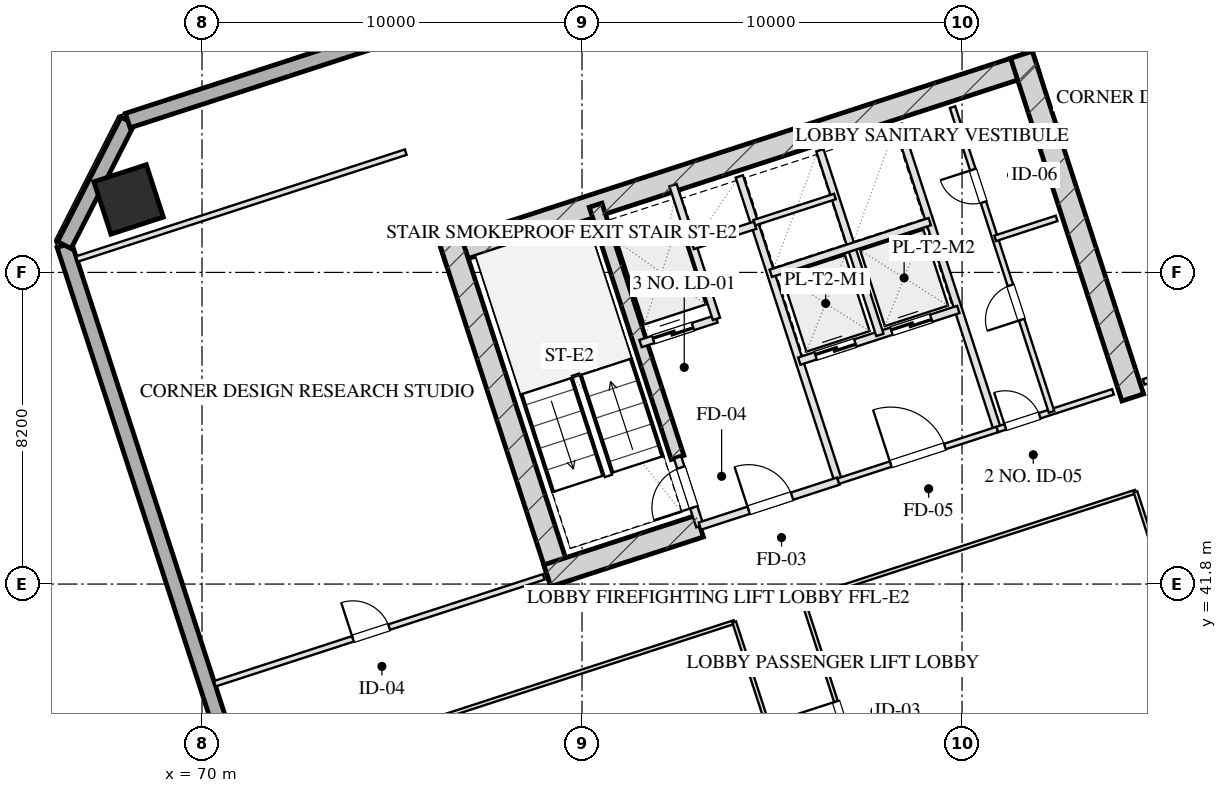
"""IFC4 building model, lengths in metres.
Left out: names, types, materials, properties, quantities, classifications, styles, units other than length and angle.
Written with IfcOpenShell. Run it as: python <this file> out.ifc"""

import sys

from ifc_helpers import new_model, si_unit, direction, frame, frame_2d, origin, origin_2d, place, context, subcontext, project, spatial, rectangle, hollow_rectangle, extrude, element, fill, save


model = new_model("IFC4")
c1 = context("Model", 3, precision=1e-05, world=origin(), true_north=direction((0.0, 1.0)))
c2 = subcontext(c1, "Body", "Model", "MODEL_VIEW")
j1 = project(units=[si_unit("LENGTHUNIT", "METRE"), si_unit("PLANEANGLEUNIT", "RADIAN")], contexts=[c1])
p1 = place(None, origin())
s1 = spatial("IfcSite", under=j1, at=p1, CompositionType="ELEMENT")
p2 = place(p1, origin())
s2 = spatial("IfcBuilding", under=s1, at=p2, CompositionType="ELEMENT")
p3 = place(p2, frame((0.0, 0.0, 127.65)))
s3 = spatial("IfcBuildingStorey", under=s2, at=p3, CompositionType="ELEMENT", Elevation=127.65)
p4 = place(p3, frame((76.344, 50.466, 0.0), z_axis=(0.0, 0.0, 1.0), x_axis=(0.951055727519, 0.309019421968, 0.0)))
e1 = element("IfcWall", 1, at=p4, inside=s3, PredefinedType="SHEAR", context=c2, shape_type="SweptSolid", body=[
    extrude(rectangle(XDim=16.4, YDim=0.6, at=frame_2d((8.2, 0.0))), origin(), (0.0, 0.0, 1.0), 3.45),
])
for number, where, z_axis, x_axis in (
    (2, (79.466, 41.828, 0.0), (0.0, 0.0, 1.0), (-0.309, 0.951, 0.0)),
    (3, (94.492, 46.71, 0.0), (0.0, 0.0, 1.0), (-0.309, 0.951, 0.0)),
):
    element("IfcWall", number, at=place(p3, frame(where, z_axis=z_axis, x_axis=x_axis)), inside=s3, PredefinedType="SHEAR", context=c2, shape_type="SweptSolid", body=[
        extrude(rectangle(XDim=9.48, YDim=0.6, at=frame_2d((4.74, 0.0))), origin(), (0.0, 0.0, 1.0), 3.45),
    ])
p5 = place(p3, frame((82.514, 45.131, 0.0), z_axis=(0.0, 0.0, 1.0), x_axis=(-0.308988790936, 0.951065679686, 0.0)))
e4 = element("IfcWall", 4, at=p5, inside=s3, PredefinedType="SHEAR", context=c2, shape_type="SweptSolid", body=[
    extrude(rectangle(XDim=6.98, YDim=0.35, at=frame_2d((3.49, 0.0))), origin(), (0.0, 0.0, 1.0), 3.45),
])
p6 = place(p3, frame((79.087, 42.021, 0.0), z_axis=(0.0, 0.0, 1.0), x_axis=(0.951062550203, 0.3089984233, 0.0)))
e5 = element("IfcWall", 5, at=p6, inside=s3, PredefinedType="SHEAR", context=c2, shape_type="SweptSolid", body=[
    extrude(rectangle(XDim=4.22, YDim=0.6, at=frame_2d((2.11, 0.0))), origin(), (0.0, 0.0, 1.0), 3.45),
])
p7 = place(p3, frame((68.069, 51.92, 0.0), z_axis=(0.0, 0.0, 1.0), x_axis=(0.951056516295, 0.309016994375, 0.0)))
e6 = element("IfcColumn", 6, at=p7, inside=s3, PredefinedType="COLUMN", context=c2, shape_type="SweptSolid", body=[
    extrude(hollow_rectangle(XDim=1.45, YDim=1.45, WallThickness=0.05, at=origin_2d()), origin(), (0.0, 0.0, 1.0), 3.451),
])
p8 = place(p3, frame((80.716, 6.59, 0.0), z_axis=(0.0, 0.0, 1.0), x_axis=(-0.309017542002, 0.95105633836, 0.0)))
e7 = element("IfcWall", 7, at=p8, inside=s3, PredefinedType="SOLIDWALL", context=c2, shape_type="SweptSolid", body=[
    extrude(rectangle(XDim=46.4, YDim=0.4, at=frame_2d((23.2, 0.0))), origin(), (0.0, 0.0, 1.0), 2.61),
])
p9 = place(p8, frame((15.675, 0.0, 0.75)))
e8 = element("IfcOpeningElement", 8, at=p9, cuts=e7, PredefinedType="OPENING", context=c2, shape_type="SweptSolid", body=[
    extrude(rectangle(XDim=2.25, YDim=1.46, at=frame_2d((1.125, 0.73))), frame((0.0, 0.21, 0.0), z_axis=(0.0, -1.0, 0.0), x_axis=(1.0, 0.0, 0.0)), (0.0, 0.0, 1.0), 0.42),
])
p10 = place(p8, frame((19.475, 0.0, 0.75)))
e9 = element("IfcOpeningElement", 9, at=p10, cuts=e7, PredefinedType="OPENING", context=c2, shape_type="SweptSolid", body=[
    extrude(rectangle(XDim=2.25, YDim=1.46, at=frame_2d((1.125, 0.73))), frame((0.0, 0.21, 0.0), z_axis=(0.0, -1.0, 0.0), x_axis=(1.0, 0.0, 0.0)), (0.0, 0.0, 1.0), 0.42),
])
p11 = place(p8, frame((24.675, 0.0, 0.75)))
e10 = element("IfcOpeningElement", 10, at=p11, cuts=e7, PredefinedType="OPENING", context=c2, shape_type="SweptSolid", body=[
    extrude(rectangle(XDim=2.25, YDim=1.46, at=frame_2d((1.125, 0.73))), frame((0.0, 0.21, 0.0), z_axis=(0.0, -1.0, 0.0), x_axis=(1.0, 0.0, 0.0)), (0.0, 0.0, 1.0), 0.42),
])
p12 = place(p8, frame((28.475, 0.0, 0.75)))
e11 = element("IfcOpeningElement", 11, at=p12, cuts=e7, PredefinedType="OPENING", context=c2, shape_type="SweptSolid", body=[
    extrude(rectangle(XDim=2.25, YDim=1.46, at=frame_2d((1.125, 0.73))), frame((0.0, 0.21, 0.0), z_axis=(0.0, -1.0, 0.0), x_axis=(1.0, 0.0, 0.0)), (0.0, 0.0, 1.0), 0.42),
])
p13 = place(p3, frame((66.377, 50.719, 0.0), z_axis=(0.0, 0.0, 1.0), x_axis=(0.454026238093, 0.890988313685, 0.0)))
e12 = element("IfcWall", 12, at=p13, inside=s3, PredefinedType="SOLIDWALL", context=c2, shape_type="SweptSolid", body=[
    extrude(rectangle(XDim=3.677, YDim=0.4, at=frame_2d((1.838, 0.0))), origin(), (0.0, 0.0, 1.0), 2.61),
])
p14 = place(p3, frame((68.047, 53.995, 0.0), z_axis=(0.0, 0.0, 1.0), x_axis=(0.95105505922, 0.309021478754, 0.0)))
e13 = element("IfcWall", 13, at=p14, inside=s3, PredefinedType="SOLIDWALL", context=c2, shape_type="SweptSolid", body=[
    extrude(rectangle(XDim=29.4, YDim=0.4, at=frame_2d((14.7, 0.0))), origin(), (0.0, 0.0, 1.0), 2.61),
])
p15 = place(p3, frame((83.101, 43.324, 0.0), z_axis=(0.0, 0.0, 1.0), x_axis=(-0.309048298632, 0.951046344356, 0.0)))
e14 = element("IfcWall", 14, at=p15, inside=s3, PredefinedType="PARTITIONING", context=c2, shape_type="SweptSolid", body=[
    extrude(rectangle(XDim=1.9, YDim=0.2, at=frame_2d((0.95, 0.0))), origin(), (0.0, 0.0, 1.0), 3.175),
])
p16 = place(p15, frame((0.52, 0.0, 0.0)))
e15 = element("IfcOpeningElement", 15, at=p16, cuts=e14, PredefinedType="OPENING", context=c2, shape_type="SweptSolid", body=[
    extrude(rectangle(XDim=1.1, YDim=2.05, at=frame_2d((0.55, 1.025))), frame((0.0, 0.11, 0.0), z_axis=(0.0, -1.0, 0.0), x_axis=(1.0, 0.0, 0.0)), (0.0, 0.0, 1.0), 0.22),
])
p17 = place(p3, frame((86.743, 44.508, 0.0), z_axis=(0.0, 0.0, 1.0), x_axis=(-0.309016001439, 0.951056838919, 0.0)))
e16 = element("IfcWall", 16, at=p17, inside=s3, PredefinedType="PARTITIONING", context=c2, shape_type="SweptSolid", body=[
    extrude(rectangle(XDim=8.43, YDim=0.2, at=frame_2d((4.215, 0.0))), origin(), (0.0, 0.0, 1.0), 3.175),
])
p18 = place(p3, frame((83.101, 43.324, 0.0), z_axis=(0.0, 0.0, 1.0), x_axis=(0.951052804469, 0.309028417967, 0.0)))
e17 = element("IfcWall", 17, at=p18, inside=s3, PredefinedType="PARTITIONING", context=c2, shape_type="SweptSolid", body=[
    extrude(rectangle(XDim=3.83, YDim=0.2, at=frame_2d((1.915, 0.0))), origin(), (0.0, 0.0, 1.0), 3.175),
])
p19 = place(p18, frame((1.35, 0.0, 0.0)))
e18 = element("IfcOpeningElement", 18, at=p19, cuts=e17, PredefinedType="OPENING", context=c2, shape_type="SweptSolid", body=[
    extrude(rectangle(XDim=1.2, YDim=2.05, at=frame_2d((0.6, 1.025))), frame((0.0, 0.11, 0.0), z_axis=(0.0, -1.0, 0.0), x_axis=(1.0, 0.0, 0.0)), (0.0, 0.0, 1.0), 0.22),
])
p20 = place(p3, frame((81.54, 48.127, 0.0), z_axis=(0.0, 0.0, 1.0), x_axis=(0.951062257173, 0.308999325213, 0.0)))
e19 = element("IfcWall", 19, at=p20, inside=s3, PredefinedType="PARTITIONING", context=c2, shape_type="SweptSolid", body=[
    extrude(rectangle(XDim=2.1, YDim=0.2, at=frame_2d((1.05, 0.0))), origin(), (0.0, 0.0, 1.0), 3.175),
])
p21 = place(p20, frame((0.35, 0.0, 0.0)))
e20 = element("IfcOpeningElement", 20, at=p21, cuts=e19, PredefinedType="OPENING", context=c2, shape_type="SweptSolid", body=[
    extrude(rectangle(XDim=1.1, YDim=2.05, at=frame_2d((0.55, 1.025))), frame((0.0, 0.11, 0.0), z_axis=(0.0, -1.0, 0.0), x_axis=(1.0, 0.0, 0.0)), (0.0, 0.0, 1.0), 0.22),
])
p22 = place(p3, frame((83.538, 48.776, 0.0), z_axis=(0.0, 0.0, 1.0), x_axis=(-0.3089935693, 0.951064127245, 0.0)))
e21 = element("IfcWall", 21, at=p22, inside=s3, PredefinedType="PARTITIONING", context=c2, shape_type="SweptSolid", body=[
    extrude(rectangle(XDim=3.7, YDim=0.2, at=frame_2d((1.85, 0.0))), origin(), (0.0, 0.0, 1.0), 3.175),
])
p23 = place(p3, frame((82.91, 50.707, 0.0), z_axis=(0.0, 0.0, 1.0), x_axis=(0.951041328149, 0.309063734775, 0.0)))
e22 = element("IfcWall", 22, at=p23, inside=s3, PredefinedType="PARTITIONING", context=c2, shape_type="SweptSolid", body=[
    extrude(rectangle(XDim=1.73, YDim=0.2, at=frame_2d((0.865, 0.0))), origin(), (0.0, 0.0, 1.0), 3.175),
])
p24 = place(p3, frame((90.928, 45.868, 0.0), z_axis=(0.0, 0.0, 1.0), x_axis=(-0.309042196757, 0.951048327176, 0.0)))
e23 = element("IfcWall", 23, at=p24, inside=s3, PredefinedType="PARTITIONING", context=c2, shape_type="SweptSolid", body=[
    extrude(rectangle(XDim=8.43, YDim=0.2, at=frame_2d((4.215, 0.0))), origin(), (0.0, 0.0, 1.0), 3.175),
])
p25 = place(p3, frame((86.743, 44.508, 0.0), z_axis=(0.0, 0.0, 1.0), x_axis=(0.951063829732, 0.308994485023, 0.0)))
e24 = element("IfcWall", 24, at=p25, inside=s3, PredefinedType="PARTITIONING", context=c2, shape_type="SweptSolid", body=[
    extrude(rectangle(XDim=4.4, YDim=0.15, at=frame_2d((2.2, 0.0))), origin(), (0.0, 0.0, 1.0), 3.175),
])
p26 = place(p25, frame((1.45, 0.0, 0.0)))
e25 = element("IfcOpeningElement", 25, at=p26, cuts=e24, PredefinedType="OPENING", context=c2, shape_type="SweptSolid", body=[
    extrude(rectangle(XDim=1.5, YDim=2.05, at=frame_2d((0.75, 1.025))), frame((0.0, 0.085, 0.0), z_axis=(0.0, -1.0, 0.0), x_axis=(1.0, 0.0, 0.0)), (0.0, 0.0, 1.0), 0.17),
])
p27 = place(p3, frame((85.718, 47.666, 0.0), z_axis=(0.0, 0.0, 1.0), x_axis=(0.951058531764, 0.30901079133, 0.0)))
e26 = element("IfcWall", 26, at=p27, inside=s3, PredefinedType="PARTITIONING", context=c2, shape_type="SweptSolid", body=[
    extrude(rectangle(XDim=4.4, YDim=0.2, at=frame_2d((2.2, 0.0))), origin(), (0.0, 0.0, 1.0), 3.175),
])
p28 = place(p27, frame((0.45, 0.0, 0.0)))
e27 = element("IfcOpeningElement", 27, at=p28, cuts=e26, PredefinedType="OPENING", context=c2, shape_type="SweptSolid", body=[
    extrude(rectangle(XDim=1.1, YDim=2.05, at=frame_2d((0.55, 1.025))), frame((0.0, 0.11, 0.0), z_axis=(0.0, -1.0, 0.0), x_axis=(1.0, 0.0, 0.0)), (0.0, 0.0, 1.0), 0.22),
])
p29 = place(p27, frame((2.55, 0.0, 0.0)))
e28 = element("IfcOpeningElement", 28, at=p29, cuts=e26, PredefinedType="OPENING", context=c2, shape_type="SweptSolid", body=[
    extrude(rectangle(XDim=1.1, YDim=2.05, at=frame_2d((0.55, 1.025))), frame((0.0, 0.11, 0.0), z_axis=(0.0, -1.0, 0.0), x_axis=(1.0, 0.0, 0.0)), (0.0, 0.0, 1.0), 0.22),
])
p30 = place(p3, frame((87.838, 48.354, 0.0), z_axis=(0.0, 0.0, 1.0), x_axis=(-0.3090093719, 0.951058992953, 0.0)))
e29 = element("IfcWall", 29, at=p30, inside=s3, PredefinedType="PARTITIONING", context=c2, shape_type="SweptSolid", body=[
    extrude(rectangle(XDim=5.11, YDim=0.2, at=frame_2d((2.555, 0.0))), origin(), (0.0, 0.0, 1.0), 3.175),
])
p31 = place(p3, frame((84.967, 49.977, 0.0), z_axis=(0.0, 0.0, 1.0), x_axis=(0.951063829732, 0.308994485023, 0.0)))
e30 = element("IfcWall", 30, at=p31, inside=s3, PredefinedType="PARTITIONING", context=c2, shape_type="SweptSolid", body=[
    extrude(rectangle(XDim=4.4, YDim=0.2, at=frame_2d((2.2, 0.0))), origin(), (0.0, 0.0, 1.0), 3.175),
])
p32 = place(p3, frame((84.534, 51.308, 0.0), z_axis=(0.0, 0.0, 1.0), x_axis=(0.951075093106, 0.308959814982, 0.0)))
e31 = element("IfcWall", 31, at=p32, inside=s3, PredefinedType="PARTITIONING", context=c2, shape_type="SweptSolid", body=[
    extrude(rectangle(XDim=2.23, YDim=0.15, at=frame_2d((1.115, 0.0))), origin(), (0.0, 0.0, 1.0), 3.175),
])
p33 = place(p3, frame((90.928, 45.868, 0.0), z_axis=(0.0, 0.0, 1.0), x_axis=(0.951059297078, 0.309008435874, 0.0)))
e32 = element("IfcWall", 32, at=p33, inside=s3, PredefinedType="PARTITIONING", context=c2, shape_type="SweptSolid", body=[
    extrude(rectangle(XDim=3.2, YDim=0.15, at=frame_2d((1.6, 0.0))), origin(), (0.0, 0.0, 1.0), 3.175),
])
p34 = place(p33, frame((0.22, 0.0, 0.0)))
e33 = element("IfcOpeningElement", 33, at=p34, cuts=e32, PredefinedType="OPENING", context=c2, shape_type="SweptSolid", body=[
    extrude(rectangle(XDim=0.95, YDim=2.05, at=frame_2d((0.475, 1.025))), frame((0.0, 0.085, 0.0), z_axis=(0.0, -1.0, 0.0), x_axis=(1.0, 0.0, 0.0)), (0.0, 0.0, 1.0), 0.17),
])
p35 = place(p3, frame((92.355, 46.331, 0.0), z_axis=(0.0, 0.0, 1.0), x_axis=(-0.309007490203, 0.951059604335, 0.0)))
e34 = element("IfcWall", 34, at=p35, inside=s3, PredefinedType="PARTITIONING", context=c2, shape_type="SweptSolid", body=[
    extrude(rectangle(XDim=8.43, YDim=0.15, at=frame_2d((4.215, 0.0))), origin(), (0.0, 0.0, 1.0), 3.175),
])
p36 = place(p35, frame((2.55, 0.0, 0.0)))
e35 = element("IfcOpeningElement", 35, at=p36, cuts=e34, PredefinedType="OPENING", context=c2, shape_type="SweptSolid", body=[
    extrude(rectangle(XDim=0.95, YDim=2.05, at=frame_2d((0.475, 1.025))), frame((0.0, 0.085, 0.0), z_axis=(0.0, -1.0, 0.0), x_axis=(1.0, 0.0, 0.0)), (0.0, 0.0, 1.0), 0.17),
])
p37 = place(p35, frame((5.8, 0.0, 0.0)))
e36 = element("IfcOpeningElement", 36, at=p37, cuts=e34, PredefinedType="OPENING", context=c2, shape_type="SweptSolid", body=[
    extrude(rectangle(XDim=0.9, YDim=2.05, at=frame_2d((0.45, 1.025))), frame((0.0, 0.085, 0.0), z_axis=(0.0, -1.0, 0.0), x_axis=(1.0, 0.0, 0.0)), (0.0, 0.0, 1.0), 0.17),
])
p38 = place(p3, frame((90.871, 50.896, 0.0), z_axis=(0.0, 0.0, 1.0), x_axis=(0.951054116971, 0.309024378638, 0.0)))
e37 = element("IfcWall", 37, at=p38, inside=s3, PredefinedType="PARTITIONING", context=c2, shape_type="SweptSolid", body=[
    extrude(rectangle(XDim=1.7, YDim=0.15, at=frame_2d((0.85, 0.0))), origin(), (0.0, 0.0, 1.0), 3.175),
])
p39 = place(p3, frame((66.707, 50.352, 0.0), z_axis=(0.0, 0.0, 1.0), x_axis=(0.951057133767, 0.309015093986, 0.0)))
e38 = element("IfcWall", 38, at=p39, inside=s3, PredefinedType="PARTITIONING", context=c2, shape_type="SweptSolid", body=[
    extrude(rectangle(XDim=9.1, YDim=0.15, at=frame_2d((4.55, 0.0))), origin(), (0.0, 0.0, 1.0), 3.175),
])
p40 = place(p3, frame((70.338, 39.177, 0.0), z_axis=(0.0, 0.0, 1.0), x_axis=(0.951059695568, 0.309007209409, 0.0)))
e39 = element("IfcWall", 39, at=p40, inside=s3, PredefinedType="PARTITIONING", context=c2, shape_type="SweptSolid", body=[
    extrude(rectangle(XDim=9.1, YDim=0.15, at=frame_2d((4.55, 0.0))), origin(), (0.0, 0.0, 1.0), 3.175),
])
p41 = place(p40, frame((3.822, 0.0, 0.0)))
e40 = element("IfcOpeningElement", 40, at=p41, cuts=e39, PredefinedType="OPENING", context=c2, shape_type="SweptSolid", body=[
    extrude(rectangle(XDim=1.0, YDim=2.05, at=frame_2d((0.5, 1.025))), frame((0.0, 0.085, 0.0), z_axis=(0.0, -1.0, 0.0), x_axis=(1.0, 0.0, 0.0)), (0.0, 0.0, 1.0), 0.17),
])
p42 = place(p3, frame((94.78, 47.119, 0.0), z_axis=(0.0, 0.0, 1.0), x_axis=(0.951054329824, 0.309023723562, 0.0)))
e41 = element("IfcWall", 41, at=p42, inside=s3, PredefinedType="PARTITIONING", context=c2, shape_type="SweptSolid", body=[
    extrude(rectangle(XDim=8.5, YDim=0.15, at=frame_2d((4.25, 0.0))), origin(), (0.0, 0.0, 1.0), 3.175),
])
p43 = place(p42, frame((3.57, 0.0, 0.0)))
e42 = element("IfcOpeningElement", 42, at=p43, cuts=e41, PredefinedType="OPENING", context=c2, shape_type="SweptSolid", body=[
    extrude(rectangle(XDim=0.85, YDim=2.05, at=frame_2d((0.425, 1.025))), frame((0.0, 0.085, 0.0), z_axis=(0.0, -1.0, 0.0), x_axis=(1.0, 0.0, 0.0)), (0.0, 0.0, 1.0), 0.17),
])
p44 = place(p3, frame((71.166, 36.629, 0.0), z_axis=(0.0, 0.0, 1.0), x_axis=(0.951057589409, 0.309013691651, 0.0)))
e43 = element("IfcWall", 43, at=p44, inside=s3, PredefinedType="MOVABLE", context=c2, shape_type="SweptSolid", body=[
    extrude(rectangle(XDim=13.5, YDim=0.1, at=frame_2d((6.75, 0.0))), origin(), (0.0, 0.0, 1.0), 3.175),
])
p45 = place(p3, frame((85.812, 41.387, 0.0), z_axis=(0.0, 0.0, 1.0), x_axis=(0.951054933035, 0.309021867106, 0.0)))
e44 = element("IfcWall", 44, at=p45, inside=s3, PredefinedType="MOVABLE", context=c2, shape_type="SweptSolid", body=[
    extrude(rectangle(XDim=9.2, YDim=0.1, at=frame_2d((4.6, 0.0))), origin(), (0.0, 0.0, 1.0), 3.175),
])
p46 = place(p3, frame((89.147, 24.975, 0.0), z_axis=(0.0, 0.0, 1.0), x_axis=(-0.309022042254, 0.951054876125, 0.0)))
e45 = element("IfcWall", 45, at=p46, inside=s3, PredefinedType="MOVABLE", context=c2, shape_type="SweptSolid", body=[
    extrude(rectangle(XDim=16.64, YDim=0.1, at=frame_2d((8.32, 0.0))), origin(), (0.0, 0.0, 1.0), 3.175),
])
p47 = place(p46, frame((3.32, 0.0, 0.0)))
e46 = element("IfcOpeningElement", 46, at=p47, cuts=e45, PredefinedType="OPENING", context=c2, shape_type="SweptSolid", body=[
    extrude(rectangle(XDim=1.0, YDim=2.05, at=frame_2d((0.5, 1.025))), frame((0.0, 0.06, 0.0), z_axis=(0.0, -1.0, 0.0), x_axis=(1.0, 0.0, 0.0)), (0.0, 0.0, 1.0), 0.12),
])
p48 = place(p46, frame((11.64, 0.0, 0.0)))
e47 = element("IfcOpeningElement", 47, at=p48, cuts=e45, PredefinedType="OPENING", context=c2, shape_type="SweptSolid", body=[
    extrude(rectangle(XDim=1.0, YDim=2.05, at=frame_2d((0.5, 1.025))), frame((0.0, 0.06, 0.0), z_axis=(0.0, -1.0, 0.0), x_axis=(1.0, 0.0, 0.0)), (0.0, 0.0, 1.0), 0.12),
])
p49 = place(p3, frame((90.954, 25.562, 0.0), z_axis=(0.0, 0.0, 1.0), x_axis=(-0.30901773025, 0.951056277195, 0.0)))
e48 = element("IfcWall", 48, at=p49, inside=s3, PredefinedType="MOVABLE", context=c2, shape_type="SweptSolid", body=[
    extrude(rectangle(XDim=16.64, YDim=0.1, at=frame_2d((8.32, 0.0))), origin(), (0.0, 0.0, 1.0), 3.175),
])
p50 = place(p49, frame((4.284, 0.0, 0.0)))
e49 = element("IfcOpeningElement", 49, at=p50, cuts=e48, PredefinedType="OPENING", context=c2, shape_type="SweptSolid", body=[
    extrude(rectangle(XDim=1.1, YDim=2.05, at=frame_2d((0.55, 1.025))), frame((0.0, 0.06, 0.0), z_axis=(0.0, -1.0, 0.0), x_axis=(1.0, 0.0, 0.0)), (0.0, 0.0, 1.0), 0.12),
])
p51 = place(p49, frame((12.724, 0.0, 0.0)))
e50 = element("IfcOpeningElement", 50, at=p51, cuts=e48, PredefinedType="OPENING", context=c2, shape_type="SweptSolid", body=[
    extrude(rectangle(XDim=1.1, YDim=2.05, at=frame_2d((0.55, 1.025))), frame((0.0, 0.06, 0.0), z_axis=(0.0, -1.0, 0.0), x_axis=(1.0, 0.0, 0.0)), (0.0, 0.0, 1.0), 0.12),
])
p52 = place(p3, frame((99.704, 28.405, 0.0), z_axis=(0.0, 0.0, 1.0), x_axis=(-0.309004459387, 0.951060589068, 0.0)))
e51 = element("IfcWall", 51, at=p52, inside=s3, PredefinedType="MOVABLE", context=c2, shape_type="SweptSolid", body=[
    extrude(rectangle(XDim=16.64, YDim=0.1, at=frame_2d((8.32, 0.0))), origin(), (0.0, 0.0, 1.0), 3.175),
])
p53 = place(p16, origin())
e52 = element("IfcDoor", 52, at=p53, inside=s3, OperationType="SINGLE_SWING_LEFT", PredefinedType="DOOR", context=c2, shape_type="SweptSolid", body=[
    extrude(rectangle(XDim=1.1, YDim=2.05, at=frame_2d((0.55, 1.025))), frame((0.0, 0.025, 0.0), z_axis=(0.0, -1.0, 0.0), x_axis=(1.0, 0.0, 0.0)), (0.0, 0.0, 1.0), 0.05),
])
fill(e15, e52)
p54 = place(p19, origin())
e53 = element("IfcDoor", 53, at=p54, inside=s3, OperationType="SINGLE_SWING_LEFT", PredefinedType="DOOR", context=c2, shape_type="SweptSolid", body=[
    extrude(rectangle(XDim=1.2, YDim=2.05, at=frame_2d((0.6, 1.025))), frame((0.0, 0.025, 0.0), z_axis=(0.0, -1.0, 0.0), x_axis=(1.0, 0.0, 0.0)), (0.0, 0.0, 1.0), 0.05),
])
fill(e18, e53)
p55 = place(p21, origin())
e54 = element("IfcDoor", 54, at=p55, inside=s3, OperationType="DOUBLE_DOOR_SLIDING", PredefinedType="DOOR", context=c2, shape_type="SweptSolid", body=[
    extrude(rectangle(XDim=1.1, YDim=2.05, at=frame_2d((0.55, 1.025))), frame((0.0, 0.025, 0.0), z_axis=(0.0, -1.0, 0.0), x_axis=(1.0, 0.0, 0.0)), (0.0, 0.0, 1.0), 0.05),
])
fill(e20, e54)
p56 = place(p26, origin())
e55 = element("IfcDoor", 55, at=p56, inside=s3, OperationType="SINGLE_SWING_LEFT", PredefinedType="DOOR", context=c2, shape_type="SweptSolid", body=[
    extrude(rectangle(XDim=1.5, YDim=2.05, at=frame_2d((0.75, 1.025))), frame((0.0, 0.025, 0.0), z_axis=(0.0, -1.0, 0.0), x_axis=(1.0, 0.0, 0.0)), (0.0, 0.0, 1.0), 0.05),
])
fill(e25, e55)
p57 = place(p28, origin())
e56 = element("IfcDoor", 56, at=p57, inside=s3, OperationType="DOUBLE_DOOR_SLIDING", PredefinedType="DOOR", context=c2, shape_type="SweptSolid", body=[
    extrude(rectangle(XDim=1.1, YDim=2.05, at=frame_2d((0.55, 1.025))), frame((0.0, 0.025, 0.0), z_axis=(0.0, -1.0, 0.0), x_axis=(1.0, 0.0, 0.0)), (0.0, 0.0, 1.0), 0.05),
])
fill(e27, e56)
p58 = place(p29, origin())
e57 = element("IfcDoor", 57, at=p58, inside=s3, OperationType="DOUBLE_DOOR_SLIDING", PredefinedType="DOOR", context=c2, shape_type="SweptSolid", body=[
    extrude(rectangle(XDim=1.1, YDim=2.05, at=frame_2d((0.55, 1.025))), frame((0.0, 0.025, 0.0), z_axis=(0.0, -1.0, 0.0), x_axis=(1.0, 0.0, 0.0)), (0.0, 0.0, 1.0), 0.05),
])
fill(e28, e57)
p59 = place(p34, origin())
e58 = element("IfcDoor", 58, at=p59, inside=s3, OperationType="SINGLE_SWING_LEFT", PredefinedType="DOOR", context=c2, shape_type="SweptSolid", body=[
    extrude(rectangle(XDim=0.95, YDim=2.05, at=frame_2d((0.475, 1.025))), frame((0.0, 0.025, 0.0), z_axis=(0.0, -1.0, 0.0), x_axis=(1.0, 0.0, 0.0)), (0.0, 0.0, 1.0), 0.05),
])
fill(e33, e58)
p60 = place(p36, origin())
e59 = element("IfcDoor", 59, at=p60, inside=s3, OperationType="SINGLE_SWING_LEFT", PredefinedType="DOOR", context=c2, shape_type="SweptSolid", body=[
    extrude(rectangle(XDim=0.95, YDim=2.05, at=frame_2d((0.475, 1.025))), frame((0.0, 0.025, 0.0), z_axis=(0.0, -1.0, 0.0), x_axis=(1.0, 0.0, 0.0)), (0.0, 0.0, 1.0), 0.05),
])
fill(e35, e59)
p61 = place(p37, origin())
e60 = element("IfcDoor", 60, at=p61, inside=s3, OperationType="SINGLE_SWING_RIGHT", PredefinedType="DOOR", context=c2, shape_type="SweptSolid", body=[
    extrude(rectangle(XDim=0.9, YDim=2.05, at=frame_2d((0.45, 1.025))), frame((0.0, 0.025, 0.0), z_axis=(0.0, -1.0, 0.0), x_axis=(1.0, 0.0, 0.0)), (0.0, 0.0, 1.0), 0.05),
])
fill(e36, e60)
p62 = place(p41, origin())
e61 = element("IfcDoor", 61, at=p62, inside=s3, OperationType="SINGLE_SWING_LEFT", PredefinedType="DOOR", context=c2, shape_type="SweptSolid", body=[
    extrude(rectangle(XDim=1.0, YDim=2.05, at=frame_2d((0.5, 1.025))), frame((0.0, 0.025, 0.0), z_axis=(0.0, -1.0, 0.0), x_axis=(1.0, 0.0, 0.0)), (0.0, 0.0, 1.0), 0.05),
])
fill(e40, e61)
p63 = place(p51, origin())
e62 = element("IfcDoor", 62, at=p63, inside=s3, OperationType="SINGLE_SWING_RIGHT", PredefinedType="DOOR", context=c2, shape_type="SweptSolid", body=[
    extrude(rectangle(XDim=1.1, YDim=2.05, at=frame_2d((0.55, 1.025))), frame((0.0, 0.025, 0.0), z_axis=(0.0, -1.0, 0.0), x_axis=(1.0, 0.0, 0.0)), (0.0, 0.0, 1.0), 0.05),
])
fill(e50, e62)
save(model, sys.argv[1])
